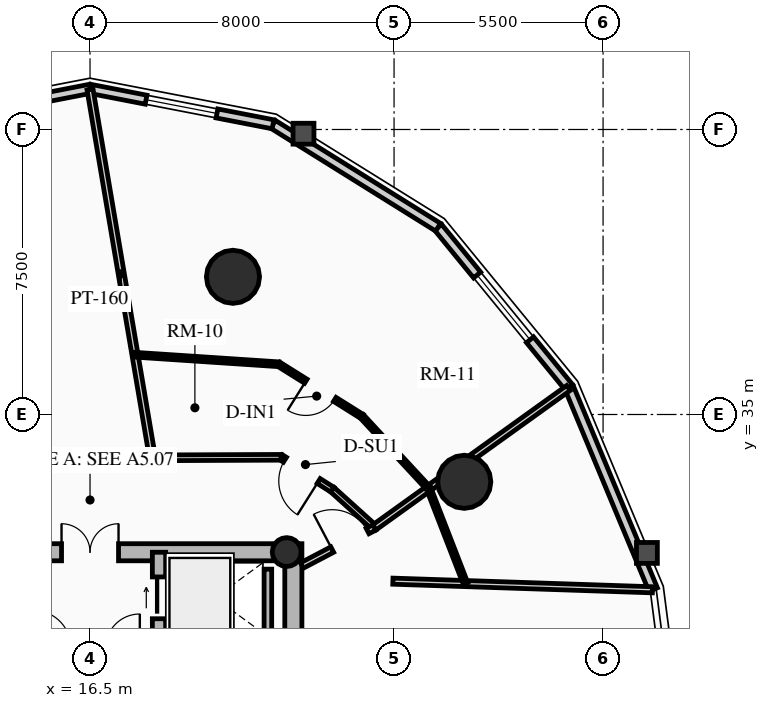
"""IFC4 building model, lengths in metres.
Left out: names, types, materials, properties, quantities, classifications, styles, units other than length and angle.
Written with IfcOpenShell. Run it as: python <this file> out.ifc"""

import sys

from ifc_helpers import new_model, si_unit, direction, frame, frame_2d, origin, origin_2d, place, context, subcontext, project, spatial, rectangle, circle, hollow_circle, extrude, source, transform, mapped, element, fill, save


model = new_model("IFC4")
c1 = context("Model", 3, precision=1e-05, world=origin(), true_north=direction((0.0, 1.0)))
c2 = subcontext(c1, "Body", "Model", "MODEL_VIEW")
j1 = project(units=[si_unit("LENGTHUNIT", "METRE"), si_unit("PLANEANGLEUNIT", "RADIAN")], contexts=[c1])
p1 = place(None, origin())
s1 = spatial("IfcSite", under=j1, at=p1, CompositionType="ELEMENT")
p2 = place(p1, origin())
s2 = spatial("IfcBuilding", under=s1, at=p2, CompositionType="ELEMENT")
p3 = place(p2, frame((0.0, 0.0, 107.98)))
s3 = spatial("IfcBuildingStorey", under=s2, at=p3, CompositionType="ELEMENT", Elevation=107.98)
p4 = place(p3, frame((21.85, 17.4, 0.0), z_axis=(0.0, 0.0, 1.0), x_axis=(0.0, 1.0, 0.0)))
e1 = element("IfcWall", 1, at=p4, inside=s3, PredefinedType="SHEAR", context=c2, shape_type="SweptSolid", body=[
    extrude(rectangle(XDim=14.2, YDim=0.45, at=frame_2d((7.1, 0.0))), origin(), (0.0, 0.0, 1.0), 2.91),
])
p5 = place(p3, frame((11.15, 31.375, 0.0), z_axis=(0.0, 0.0, 1.0), x_axis=(1.0, 0.0, 0.0)))
e2 = element("IfcWall", 2, at=p5, inside=s3, PredefinedType="SHEAR", context=c2, shape_type="SweptSolid", body=[
    extrude(rectangle(XDim=10.7, YDim=0.45, at=frame_2d((5.35, 0.0))), origin(), (0.0, 0.0, 1.0), 2.91),
])
m1 = source(origin(), c2, "Body", "SweptSolid", [
    extrude(rectangle(XDim=1.5, YDim=2.02, at=frame_2d((0.75, 1.01))), frame((0.0, 0.235, 0.0), z_axis=(0.0, -1.0, 0.0), x_axis=(1.0, 0.0, 0.0)), (0.0, 0.0, 1.0), 0.47),
])
p6 = place(p5, frame((4.6, 0.0, 0.0)))
e3 = element("IfcOpeningElement", 3, at=p6, cuts=e2, PredefinedType="OPENING", context=c2, shape_type="MappedRepresentation", body=[
    mapped(m1, transform((0.0, 0.0, 0.0), x_axis=(1.0, 0.0, 0.0), y_axis=(0.0, 1.0, 0.0), z_axis=(0.0, 0.0, 1.0), scale=1.0)),
])
p7 = place(p3, frame((18.315, 17.625, 0.0), z_axis=(0.0, 0.0, 1.0), x_axis=(0.0, 1.0, 0.0)))
e4 = element("IfcWall", 4, at=p7, inside=s3, PredefinedType="SHEAR", context=c2, shape_type="SweptSolid", body=[
    extrude(rectangle(XDim=13.75, YDim=0.35, at=frame_2d((6.875, 0.0))), origin(), (0.0, 0.0, 1.0), 2.91),
])
m2 = source(origin(), c2, "Body", "SweptSolid", [
    extrude(rectangle(XDim=1.1, YDim=2.015, at=frame_2d((0.55, 1.007))), frame((0.0, 0.185, 0.0), z_axis=(0.0, -1.0, 0.0), x_axis=(1.0, 0.0, 0.0)), (0.0, 0.0, 1.0), 0.37),
])
p8 = place(p7, frame((10.0, 0.0, 0.0)))
e5 = element("IfcOpeningElement", 5, at=p8, cuts=e4, PredefinedType="OPENING", context=c2, shape_type="MappedRepresentation", body=[
    mapped(m2, transform((0.0, 0.0, 0.0), x_axis=(1.0, 0.0, 0.0), y_axis=(0.0, 1.0, 0.0), z_axis=(0.0, 0.0, 1.0), scale=1.0)),
])
p9 = place(p7, frame((12.0, 0.0, 0.0)))
e6 = element("IfcOpeningElement", 6, at=p9, cuts=e4, PredefinedType="OPENING", context=c2, shape_type="MappedRepresentation", body=[
    mapped(m2, transform((0.0, 0.0, 0.0), x_axis=(1.0, 0.0, 0.0), y_axis=(0.0, 1.0, 0.0), z_axis=(0.0, 0.0, 1.0), scale=1.0)),
])
m3 = source(origin(), c2, "Body", "SweptSolid", [
    extrude(rectangle(XDim=1.15, YDim=2.02, at=frame_2d((0.575, 1.01))), frame((0.0, 0.185, 0.0), z_axis=(0.0, -1.0, 0.0), x_axis=(1.0, 0.0, 0.0)), (0.0, 0.0, 1.0), 0.37),
])
p10 = place(p7, frame((5.305, 0.0, 0.0)))
e7 = element("IfcOpeningElement", 7, at=p10, cuts=e4, PredefinedType="OPENING", context=c2, shape_type="MappedRepresentation", body=[
    mapped(m3, transform((0.0, 0.0, 0.0), x_axis=(1.0, 0.0, 0.0), y_axis=(0.0, 1.0, 0.0), z_axis=(0.0, 0.0, 1.0), scale=1.0)),
])
p11 = place(p3, frame((21.675, 31.38, 0.0), z_axis=(0.0, 0.0, 1.0), x_axis=(1.0, 0.0, 0.0)))
e8 = element("IfcColumn", 8, at=p11, inside=s3, PredefinedType="COLUMN", context=c2, shape_type="SweptSolid", body=[
    extrude(hollow_circle(Radius=0.38, WallThickness=0.032, at=origin_2d()), origin(), (0.0, 0.0, 1.0), 2.91),
])
for number, where, z_axis, x_axis in (
    (9, (26.347, 33.229, 0.0), (0.0, 0.0, 1.0), (1.0, 0.0, 0.0)),
    (10, (20.261, 38.623, 0.0), (0.0, 0.0, 1.0), (1.0, 0.0, 0.0)),
):
    element("IfcColumn", number, at=place(p3, frame(where, z_axis=z_axis, x_axis=x_axis)), inside=s3, PredefinedType="USERDEFINED", context=c2, shape_type="SweptSolid", body=[
        extrude(circle(Radius=0.7, at=origin_2d()), origin(), (0.0, 0.0, 1.0), 2.91),
    ])
p12 = place(p3, frame((29.105, 35.709, 0.0), z_axis=(0.0, 0.0, 1.0), x_axis=(0.384344417632, -0.923189779317, 0.0)))
e11 = element("IfcWall", 11, at=p12, inside=s3, PredefinedType="SOLIDWALL", context=c2, shape_type="SweptSolid", body=[
    extrude(rectangle(XDim=5.758, YDim=0.24, at=frame_2d((2.879, 0.0))), origin(), (0.0, 0.0, 1.0), 2.179),
])
p13 = place(p3, frame((25.658, 39.928, 0.0), z_axis=(0.0, 0.0, 1.0), x_axis=(0.632700781152, -0.77439635945, 0.0)))
e12 = element("IfcWall", 12, at=p13, inside=s3, PredefinedType="SOLIDWALL", context=c2, shape_type="SweptSolid", body=[
    extrude(rectangle(XDim=5.448, YDim=0.24, at=frame_2d((2.724, 0.0))), origin(), (0.0, 0.0, 1.0), 2.179),
])
m4 = source(origin(), c2, "Body", "SweptSolid", [
    extrude(rectangle(XDim=2.2, YDim=1.35, at=frame_2d((1.1, 0.675))), frame((0.0, 0.13, 0.0), z_axis=(0.0, -1.0, 0.0), x_axis=(1.0, 0.0, 0.0)), (0.0, 0.0, 1.0), 0.26),
])
p14 = place(p13, frame((1.624, 0.0, 0.65)))
e13 = element("IfcOpeningElement", 13, at=p14, cuts=e12, PredefinedType="OPENING", context=c2, shape_type="MappedRepresentation", body=[
    mapped(m4, transform((0.0, 0.0, 0.0), x_axis=(1.0, 0.0, 0.0), y_axis=(0.0, 1.0, 0.0), z_axis=(0.0, 0.0, 1.0), scale=1.0)),
])
p15 = place(p3, frame((21.315, 42.637, 0.0), z_axis=(0.0, 0.0, 1.0), x_axis=(0.848520380187, -0.529162701263, 0.0)))
e14 = element("IfcWall", 14, at=p15, inside=s3, PredefinedType="SOLIDWALL", context=c2, shape_type="SweptSolid", body=[
    extrude(rectangle(XDim=5.119, YDim=0.24, at=frame_2d((2.56, 0.0))), origin(), (0.0, 0.0, 1.0), 2.179),
])
p16 = place(p3, frame((16.5, 43.57, 0.0), z_axis=(0.0, 0.0, 1.0), x_axis=(0.981723785992, -0.190311344954, 0.0)))
e15 = element("IfcWall", 15, at=p16, inside=s3, PredefinedType="SOLIDWALL", context=c2, shape_type="SweptSolid", body=[
    extrude(rectangle(XDim=4.904, YDim=0.24, at=frame_2d((2.452, 0.0))), origin(), (0.0, 0.0, 1.0), 2.179),
])
m5 = source(origin(), c2, "Body", "SweptSolid", [
    extrude(rectangle(XDim=1.9, YDim=1.35, at=frame_2d((0.95, 0.675))), frame((0.0, 0.13, 0.0), z_axis=(0.0, -1.0, 0.0), x_axis=(1.0, 0.0, 0.0)), (0.0, 0.0, 1.0), 0.26),
])
p17 = place(p16, frame((1.502, 0.0, 0.65)))
e16 = element("IfcOpeningElement", 16, at=p17, cuts=e15, PredefinedType="OPENING", context=c2, shape_type="MappedRepresentation", body=[
    mapped(m5, transform((0.0, 0.0, 0.0), x_axis=(1.0, 0.0, 0.0), y_axis=(0.0, 1.0, 0.0), z_axis=(0.0, 0.0, 1.0), scale=1.0)),
])
p18 = place(p3, frame((11.685, 42.637, 0.0), z_axis=(0.0, 0.0, 1.0), x_axis=(0.981723785992, 0.190311344954, 0.0)))
e17 = element("IfcWall", 17, at=p18, inside=s3, PredefinedType="SOLIDWALL", context=c2, shape_type="SweptSolid", body=[
    extrude(rectangle(XDim=4.904, YDim=0.24, at=frame_2d((2.452, 0.0))), origin(), (0.0, 0.0, 1.0), 2.179),
])
p19 = place(p18, frame((1.352, 0.0, 0.65)))
e18 = element("IfcOpeningElement", 18, at=p19, cuts=e17, PredefinedType="OPENING", context=c2, shape_type="MappedRepresentation", body=[
    mapped(m4, transform((0.0, 0.0, 0.0), x_axis=(1.0, 0.0, 0.0), y_axis=(0.0, 1.0, 0.0), z_axis=(0.0, 0.0, 1.0), scale=1.0)),
])
p20 = place(p3, frame((21.18, 29.295, 0.0), z_axis=(0.0, 0.0, 1.0), x_axis=(0.0, 1.0, 0.0)))
e19 = element("IfcWall", 19, at=p20, inside=s3, PredefinedType="SHEAR", context=c2, shape_type="SweptSolid", body=[
    extrude(rectangle(XDim=1.635, YDim=0.2, at=frame_2d((0.817, 0.0))), origin(), (0.0, 0.0, 1.0), 2.91),
])
p21 = place(p3, frame((23.98, 32.027, 0.0), z_axis=(0.0, 0.0, 1.0), x_axis=(-0.742353224332, 0.670008724065, 0.0)))
e20 = element("IfcWall", 20, at=p21, inside=s3, PredefinedType="PARTITIONING", context=c2, shape_type="SweptSolid", body=[
    extrude(rectangle(XDim=1.485, YDim=0.15, at=frame_2d((0.742, 0.0))), origin(), (0.0, 0.0, 1.0), 2.225),
])
p22 = place(p3, frame((22.877, 33.022, 0.0), z_axis=(0.0, 0.0, 1.0), x_axis=(-0.845895608855, 0.533348496689, 0.0)))
e21 = element("IfcWall", 21, at=p22, inside=s3, PredefinedType="PARTITIONING", context=c2, shape_type="SweptSolid", body=[
    extrude(rectangle(XDim=1.597, YDim=0.15, at=frame_2d((0.798, 0.0))), origin(), (0.0, 0.0, 1.0), 2.225),
])
m6 = source(origin(), c2, "Body", "SweptSolid", [
    extrude(rectangle(XDim=1.05, YDim=2.015, at=frame_2d((0.525, 1.007))), frame((0.0, 0.085, 0.0), z_axis=(0.0, -1.0, 0.0), x_axis=(1.0, 0.0, 0.0)), (0.0, 0.0, 1.0), 0.17),
])
p23 = place(p22, frame((0.427, 0.0, 0.0)))
e22 = element("IfcOpeningElement", 22, at=p23, cuts=e21, PredefinedType="OPENING", context=c2, shape_type="MappedRepresentation", body=[
    mapped(m6, transform((0.0, 0.0, 0.0), x_axis=(1.0, 0.0, 0.0), y_axis=(0.0, 1.0, 0.0), z_axis=(0.0, 0.0, 1.0), scale=1.0)),
])
p24 = place(p3, frame((21.527, 33.873, 0.0), z_axis=(0.0, 0.0, 1.0), x_axis=(-0.999991838845, -0.004040079574, 0.0)))
e23 = element("IfcWall", 23, at=p24, inside=s3, PredefinedType="PARTITIONING", context=c2, shape_type="SweptSolid", body=[
    extrude(rectangle(XDim=3.384, YDim=0.15, at=frame_2d((1.692, 0.0))), origin(), (0.0, 0.0, 1.0), 2.225),
])
p25 = place(p3, frame((18.143, 33.86, 0.0), z_axis=(0.0, 0.0, 1.0), x_axis=(-0.999419208319, -0.034077060363, 0.0)))
e24 = element("IfcWall", 24, at=p25, inside=s3, PredefinedType="PARTITIONING", context=c2, shape_type="SweptSolid", body=[
    extrude(rectangle(XDim=6.527, YDim=0.15, at=frame_2d((3.263, 0.0))), origin(), (0.0, 0.0, 1.0), 2.225),
])
p26 = place(p3, frame((24.469, 30.614, 0.0), z_axis=(0.0, 0.0, 1.0), x_axis=(0.999446768925, -0.033258924898, 0.0)))
e25 = element("IfcWall", 25, at=p26, inside=s3, PredefinedType="PARTITIONING", context=c2, shape_type="SweptSolid", body=[
    extrude(rectangle(XDim=6.834, YDim=0.16, at=frame_2d((3.417, 0.0))), origin(), (0.0, 0.0, 1.0), 2.179),
])
p27 = place(p3, frame((23.98, 32.027, 0.0), z_axis=(0.0, 0.0, 1.0), x_axis=(0.812162479031, 0.58343132214, 0.0)))
e26 = element("IfcWall", 26, at=p27, inside=s3, PredefinedType="PARTITIONING", context=c2, shape_type="SweptSolid", body=[
    extrude(rectangle(XDim=6.291, YDim=0.16, at=frame_2d((3.146, 0.0))), origin(), (0.0, 0.0, 1.0), 2.179),
])
p28 = place(p3, frame((18.143, 33.86, 0.0), z_axis=(0.0, 0.0, 1.0), x_axis=(-0.167145472003, 0.985932244725, 0.0)))
e27 = element("IfcWall", 27, at=p28, inside=s3, PredefinedType="PARTITIONING", context=c2, shape_type="SweptSolid", body=[
    extrude(rectangle(XDim=9.829, YDim=0.16, at=frame_2d((4.914, 0.0))), origin(), (0.0, 0.0, 1.0), 2.179),
])
p29 = place(p3, frame((22.075, 31.025, 0.0), z_axis=(0.0, 0.0, 1.0), x_axis=(0.885026466958, 0.465540710125, 0.0)))
e28 = element("IfcWall", 28, at=p29, inside=s3, PredefinedType="PARTITIONING", context=c2, shape_type="SweptSolid", body=[
    extrude(rectangle(XDim=2.152, YDim=0.16, at=frame_2d((1.076, 0.0))), origin(), (0.0, 0.0, 1.0), 2.225),
])
m7 = source(origin(), c2, "Body", "SweptSolid", [
    extrude(rectangle(XDim=1.05, YDim=2.015, at=frame_2d((0.525, 1.007))), frame((0.0, 0.09, 0.0), z_axis=(0.0, -1.0, 0.0), x_axis=(1.0, 0.0, 0.0)), (0.0, 0.0, 1.0), 0.18),
])
p30 = place(p29, frame((0.902, 0.0, 0.0)))
e29 = element("IfcOpeningElement", 29, at=p30, cuts=e28, PredefinedType="OPENING", context=c2, shape_type="MappedRepresentation", body=[
    mapped(m7, transform((0.0, 0.0, 0.0), x_axis=(1.0, 0.0, 0.0), y_axis=(0.0, 1.0, 0.0), z_axis=(0.0, 0.0, 1.0), scale=1.0)),
])
p31 = place(p3, frame((26.382, 30.551, 0.0), z_axis=(0.0, 0.0, 1.0), x_axis=(-0.361621391028, 0.932325034283, 0.0)))
e30 = element("IfcWall", 30, at=p31, inside=s3, PredefinedType="PARTITIONING", context=c2, shape_type="SweptSolid", body=[
    extrude(rectangle(XDim=2.686, YDim=0.125, at=frame_2d((1.343, 0.0))), origin(), (0.0, 0.0, 1.0), 2.225),
])
p32 = place(p3, frame((25.41, 33.054, 0.0), z_axis=(0.0, 0.0, 1.0), x_axis=(-0.679733694606, 0.73345899982, 0.0)))
e31 = element("IfcWall", 31, at=p32, inside=s3, PredefinedType="PARTITIONING", context=c2, shape_type="SweptSolid", body=[
    extrude(rectangle(XDim=2.586, YDim=0.125, at=frame_2d((1.293, 0.0))), origin(), (0.0, 0.0, 1.0), 2.655),
])
p33 = place(p3, frame((23.653, 34.951, 0.0), z_axis=(0.0, 0.0, 1.0), x_axis=(-0.847306782665, 0.531103771452, 0.0)))
e32 = element("IfcWall", 32, at=p33, inside=s3, PredefinedType="PARTITIONING", context=c2, shape_type="SweptSolid", body=[
    extrude(rectangle(XDim=2.581, YDim=0.125, at=frame_2d((1.291, 0.0))), origin(), (0.0, 0.0, 1.0), 2.225),
])
m8 = source(origin(), c2, "Body", "SweptSolid", [
    extrude(rectangle(XDim=0.9, YDim=2.005, at=frame_2d((0.45, 1.002))), frame((0.0, 0.073, 0.0), z_axis=(0.0, -1.0, 0.0), x_axis=(1.0, 0.0, 0.0)), (0.0, 0.0, 1.0), 0.145),
])
p34 = place(p33, frame((0.841, 0.0, 0.0)))
e33 = element("IfcOpeningElement", 33, at=p34, cuts=e32, PredefinedType="OPENING", context=c2, shape_type="MappedRepresentation", body=[
    mapped(m8, transform((0.0, 0.0, 0.0), x_axis=(1.0, 0.0, 0.0), y_axis=(0.0, 1.0, 0.0), z_axis=(0.0, 0.0, 1.0), scale=1.0)),
])
p35 = place(p3, frame((21.466, 36.322, 0.0), z_axis=(0.0, 0.0, 1.0), x_axis=(-0.997806476515, 0.066198454847, 0.0)))
e34 = element("IfcWall", 34, at=p35, inside=s3, PredefinedType="PARTITIONING", context=c2, shape_type="SweptSolid", body=[
    extrude(rectangle(XDim=3.791, YDim=0.125, at=frame_2d((1.896, 0.0))), origin(), (0.0, 0.0, 1.0), 2.225),
])
m9 = source(origin(), c2, "Body", "SweptSolid", [
    extrude(rectangle(XDim=2.2, YDim=1.35, at=frame_2d((1.1, 0.675))), frame((0.0, 0.03, 0.0), z_axis=(0.0, -1.0, 0.0), x_axis=(1.0, 0.0, 0.0)), (0.0, 0.0, 1.0), 0.06),
])
p36 = place(p14, origin())
e35 = element("IfcWindow", 35, at=p36, inside=s3, PartitioningType="DOUBLE_PANEL_VERTICAL", PredefinedType="WINDOW", context=c2, shape_type="MappedRepresentation", body=[
    mapped(m9, transform((0.0, 0.0, 0.0), x_axis=(1.0, 0.0, 0.0), y_axis=(0.0, 1.0, 0.0), z_axis=(0.0, 0.0, 1.0), scale=1.0)),
])
fill(e13, e35)
m10 = source(origin(), c2, "Body", "SweptSolid", [
    extrude(rectangle(XDim=1.9, YDim=1.35, at=frame_2d((0.95, 0.675))), frame((0.0, 0.03, 0.0), z_axis=(0.0, -1.0, 0.0), x_axis=(1.0, 0.0, 0.0)), (0.0, 0.0, 1.0), 0.06),
])
p37 = place(p17, origin())
e36 = element("IfcWindow", 36, at=p37, inside=s3, PartitioningType="DOUBLE_PANEL_VERTICAL", PredefinedType="WINDOW", context=c2, shape_type="MappedRepresentation", body=[
    mapped(m10, transform((0.0, 0.0, 0.0), x_axis=(1.0, 0.0, 0.0), y_axis=(0.0, 1.0, 0.0), z_axis=(0.0, 0.0, 1.0), scale=1.0)),
])
fill(e16, e36)
m11 = source(origin(), c2, "Body", "SweptSolid", [
    extrude(rectangle(XDim=1.1, YDim=2.015, at=frame_2d((0.55, 1.007))), frame((0.0, 0.025, 0.0), z_axis=(0.0, -1.0, 0.0), x_axis=(1.0, 0.0, 0.0)), (0.0, 0.0, 1.0), 0.05),
])
p38 = place(p9, origin())
e37 = element("IfcDoor", 37, at=p38, inside=s3, OperationType="SLIDING_TO_RIGHT", PredefinedType="DOOR", context=c2, shape_type="MappedRepresentation", body=[
    mapped(m11, transform((0.0, 0.0, 0.0), x_axis=(1.0, 0.0, 0.0), y_axis=(0.0, 1.0, 0.0), z_axis=(0.0, 0.0, 1.0), scale=1.0)),
])
fill(e6, e37)
m12 = source(origin(), c2, "Body", "SweptSolid", [
    extrude(rectangle(XDim=1.5, YDim=2.02, at=frame_2d((0.75, 1.01))), frame((0.0, 0.025, 0.0), z_axis=(0.0, -1.0, 0.0), x_axis=(1.0, 0.0, 0.0)), (0.0, 0.0, 1.0), 0.05),
])
p39 = place(p6, origin())
e38 = element("IfcDoor", 38, at=p39, inside=s3, OperationType="DOUBLE_DOOR_SINGLE_SWING", PredefinedType="DOOR", context=c2, shape_type="MappedRepresentation", body=[
    mapped(m12, transform((0.0, 0.0, 0.0), x_axis=(1.0, 0.0, 0.0), y_axis=(0.0, 1.0, 0.0), z_axis=(0.0, 0.0, 1.0), scale=1.0)),
])
fill(e3, e38)
m13 = source(origin(), c2, "Body", "SweptSolid", [
    extrude(rectangle(XDim=1.05, YDim=2.015, at=frame_2d((0.525, 1.007))), frame((0.0, 0.025, 0.0), z_axis=(0.0, -1.0, 0.0), x_axis=(1.0, 0.0, 0.0)), (0.0, 0.0, 1.0), 0.05),
])
p40 = place(p30, origin())
e39 = element("IfcDoor", 39, at=p40, inside=s3, OperationType="SINGLE_SWING_LEFT", PredefinedType="DOOR", context=c2, shape_type="MappedRepresentation", body=[
    mapped(m13, transform((0.0, 0.0, 0.0), x_axis=(1.0, 0.0, 0.0), y_axis=(0.0, 1.0, 0.0), z_axis=(0.0, 0.0, 1.0), scale=1.0)),
])
fill(e29, e39)
p41 = place(p23, origin())
e40 = element("IfcDoor", 40, at=p41, inside=s3, OperationType="SINGLE_SWING_LEFT", PredefinedType="DOOR", context=c2, shape_type="MappedRepresentation", body=[
    mapped(m13, transform((0.0, 0.0, 0.0), x_axis=(1.0, 0.0, 0.0), y_axis=(0.0, 1.0, 0.0), z_axis=(0.0, 0.0, 1.0), scale=1.0)),
])
fill(e22, e40)
m14 = source(origin(), c2, "Body", "SweptSolid", [
    extrude(rectangle(XDim=0.9, YDim=2.005, at=frame_2d((0.45, 1.002))), frame((0.0, 0.025, 0.0), z_axis=(0.0, -1.0, 0.0), x_axis=(1.0, 0.0, 0.0)), (0.0, 0.0, 1.0), 0.05),
])
p42 = place(p34, origin())
e41 = element("IfcDoor", 41, at=p42, inside=s3, OperationType="SINGLE_SWING_RIGHT", PredefinedType="DOOR", context=c2, shape_type="MappedRepresentation", body=[
    mapped(m14, transform((0.0, 0.0, 0.0), x_axis=(1.0, 0.0, 0.0), y_axis=(0.0, 1.0, 0.0), z_axis=(0.0, 0.0, 1.0), scale=1.0)),
])
fill(e33, e41)
save(model, sys.argv[1])
